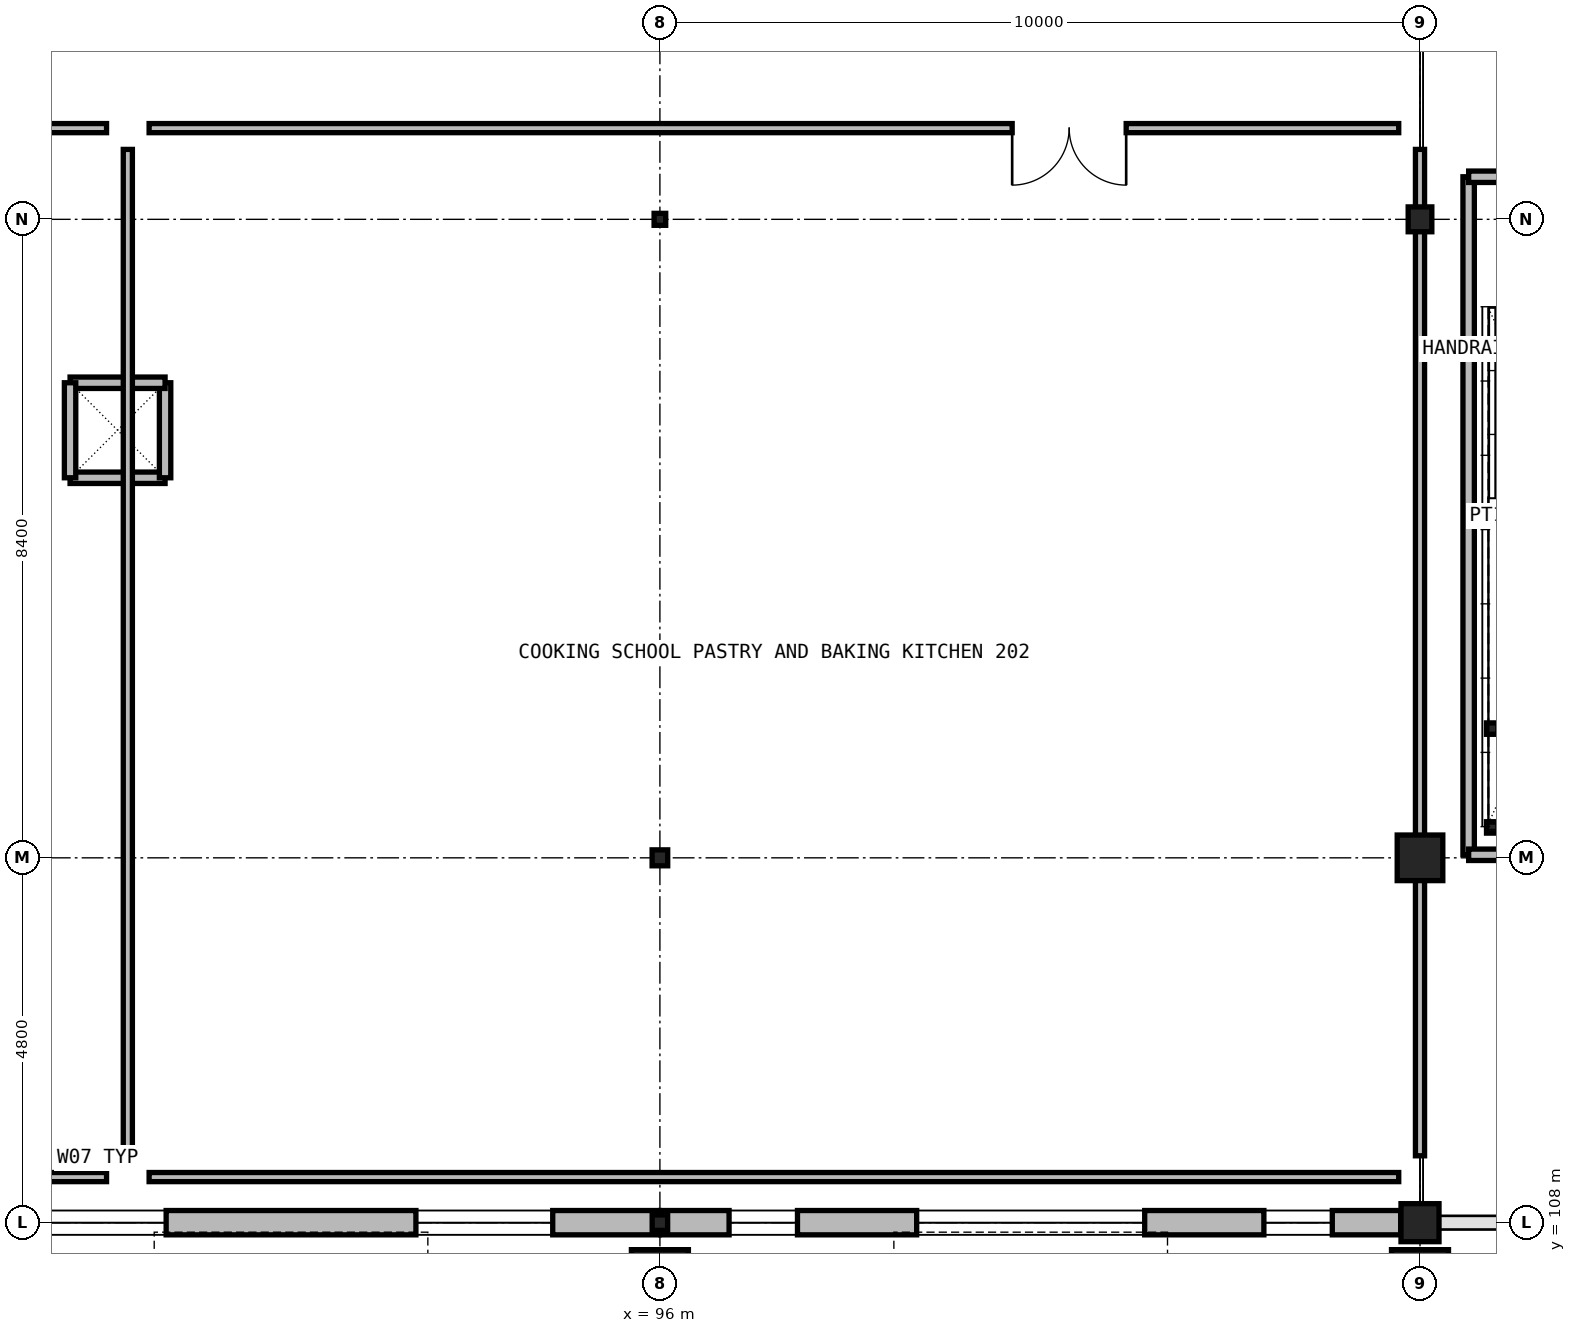
"""IFC4 building model, lengths in metres.
Left out: names, types, materials, properties, quantities, classifications, styles, units other than length and angle.
Written with IfcOpenShell. Run it as: python <this file> out.ifc"""

import sys

from ifc_helpers import new_model, si_unit, direction, frame, frame_2d, origin, origin_2d_with_axis, place, context, subcontext, project, spatial, rectangle, hollow_rectangle, i_section, extrude, element, fill, save


model = new_model("IFC4")
c1 = context("Model", 3, precision=1e-05, world=origin(), true_north=direction((0.0, 1.0)))
c2 = subcontext(c1, "Body", "Model", "MODEL_VIEW")
j1 = project(units=[si_unit("LENGTHUNIT", "METRE"), si_unit("PLANEANGLEUNIT", "RADIAN")], contexts=[c1])
p1 = place(None, origin())
s1 = spatial("IfcSite", under=j1, at=p1, CompositionType="ELEMENT")
p2 = place(p1, origin())
s2 = spatial("IfcBuilding", under=s1, at=p2, CompositionType="ELEMENT")
p3 = place(p2, frame((0.0, 0.0, 8.4)))
s3 = spatial("IfcBuildingStorey", under=s2, at=p3, CompositionType="ELEMENT", Elevation=8.4)
for number, where, z_axis, x_axis in (
    (1, (96.0, 107.42, 0.0), (0.0, 0.0, 1.0), (1.0, 0.0, 0.0)),
    (2, (106.0, 107.42, 0.0), (0.0, 0.0, 1.0), (1.0, 0.0, 0.0)),
):
    element("IfcColumn", number, at=place(p3, frame(where, z_axis=z_axis, x_axis=x_axis)), inside=s3, PredefinedType="PILASTER", context=c2, shape_type="SweptSolid", body=[
        extrude(rectangle(XDim=0.75, YDim=0.45, at=origin_2d_with_axis()), origin(), (0.0, 0.0, 1.0), 3.6),
    ])
p4 = place(p3, frame((96.0, 108.0, 0.0), z_axis=(0.0, 0.0, 1.0), x_axis=(1.0, 0.0, 0.0)))
e3 = element("IfcColumn", 3, at=p4, inside=s3, PredefinedType="COLUMN", context=c2, shape_type="SweptSolid", body=[
    extrude(i_section(OverallWidth=0.203, OverallDepth=0.203, WebThickness=0.007, FlangeThickness=0.011, FilletRadius=0.011, at=origin_2d_with_axis()), origin(), (0.0, 0.0, 1.0), 3.6),
])
p5 = place(p3, frame((96.0, 112.8, 0.0), z_axis=(0.0, 0.0, 1.0), x_axis=(1.0, 0.0, 0.0)))
e4 = element("IfcColumn", 4, at=p5, inside=s3, PredefinedType="COLUMN", context=c2, shape_type="SweptSolid", body=[
    extrude(i_section(OverallWidth=0.205, OverallDepth=0.21, WebThickness=0.009, FlangeThickness=0.014, FilletRadius=0.011, at=origin_2d_with_axis()), origin(), (0.0, 0.0, 1.0), 3.6),
])
p6 = place(p3, frame((96.0, 121.2, 0.0), z_axis=(0.0, 0.0, 1.0), x_axis=(1.0, 0.0, 0.0)))
e5 = element("IfcColumn", 5, at=p6, inside=s3, PredefinedType="COLUMN", context=c2, shape_type="SweptSolid", body=[
    extrude(i_section(OverallWidth=0.153, OverallDepth=0.158, WebThickness=0.007, FlangeThickness=0.01, FilletRadius=0.009, at=origin_2d_with_axis()), origin(), (0.0, 0.0, 1.0), 3.6),
])
p7 = place(p3, frame((106.0, 108.0, 0.0), z_axis=(0.0, 0.0, 1.0), x_axis=(1.0, 0.0, 0.0)))
e6 = element("IfcColumn", 6, at=p7, inside=s3, PredefinedType="COLUMN", context=c2, shape_type="SweptSolid", body=[
    extrude(rectangle(XDim=0.5, YDim=0.5, at=origin_2d_with_axis()), origin(), (0.0, 0.0, 1.0), 3.6),
])
p8 = place(p3, frame((106.0, 112.8, 0.0), z_axis=(0.0, 0.0, 1.0), x_axis=(1.0, 0.0, 0.0)))
e7 = element("IfcColumn", 7, at=p8, inside=s3, PredefinedType="COLUMN", context=c2, shape_type="SweptSolid", body=[
    extrude(rectangle(XDim=0.6, YDim=0.6, at=origin_2d_with_axis()), origin(), (0.0, 0.0, 1.0), 3.6),
])
p9 = place(p3, frame((106.0, 121.2, 0.0), z_axis=(0.0, 0.0, 1.0), x_axis=(1.0, 0.0, 0.0)))
e8 = element("IfcColumn", 8, at=p9, inside=s3, PredefinedType="COLUMN", context=c2, shape_type="SweptSolid", body=[
    extrude(i_section(OverallWidth=0.311, OverallDepth=0.327, WebThickness=0.016, FlangeThickness=0.025, FilletRadius=0.017, at=origin_2d_with_axis()), origin(), (0.0, 0.0, 1.0), 3.6),
])
for number, where, z_axis, x_axis in (
    (9, (106.95, 113.2, 0.0), (0.0, 0.0, 1.0), (1.0, 0.0, 0.0)),
    (10, (106.95, 114.5, 0.0), (0.0, 0.0, 1.0), (1.0, 0.0, 0.0)),
):
    element("IfcColumn", number, at=place(p3, frame(where, z_axis=z_axis, x_axis=x_axis)), inside=s3, PredefinedType="COLUMN", context=c2, shape_type="SweptSolid", body=[
        extrude(hollow_rectangle(XDim=0.15, YDim=0.15, WallThickness=0.006, InnerFilletRadius=0.006, OuterFilletRadius=0.012, at=origin_2d_with_axis()), origin(), (0.0, 0.0, 1.0), 3.6),
    ])
p10 = place(p3, frame((86.304, 108.0, 0.0), z_axis=(0.0, 0.0, 1.0), x_axis=(1.0, 0.0, 0.0)))
e11 = element("IfcWall", 11, at=p10, inside=s3, PredefinedType="SOLIDWALL", context=c2, shape_type="SweptSolid", body=[
    extrude(rectangle(XDim=9.686, YDim=0.32, at=frame_2d((4.843, 0.0), x_axis=(1.0, 0.0))), origin(), (0.0, 0.0, 1.0), 2.92),
])
p11 = place(p10, frame((1.4, 0.0, 0.85)))
e12 = element("IfcOpeningElement", 12, at=p11, cuts=e11, PredefinedType="OPENING", context=c2, shape_type="SweptSolid", body=[
    extrude(rectangle(XDim=1.8, YDim=1.9, at=frame_2d((0.9, 0.95), x_axis=(1.0, 0.0))), frame((0.0, 0.17, 0.0), z_axis=(0.0, -1.0, 0.0), x_axis=(1.0, 0.0, 0.0)), (0.0, 0.0, 1.0), 0.34),
])
p12 = place(p10, frame((6.486, 0.0, 0.85)))
e13 = element("IfcOpeningElement", 13, at=p12, cuts=e11, PredefinedType="OPENING", context=c2, shape_type="SweptSolid", body=[
    extrude(rectangle(XDim=1.8, YDim=1.9, at=frame_2d((0.9, 0.95), x_axis=(1.0, 0.0))), frame((0.0, 0.17, 0.0), z_axis=(0.0, -1.0, 0.0), x_axis=(1.0, 0.0, 0.0)), (0.0, 0.0, 1.0), 0.34),
])
p13 = place(p3, frame((96.01, 108.0, 0.0), z_axis=(0.0, 0.0, 1.0), x_axis=(1.0, 0.0, 0.0)))
e14 = element("IfcWall", 14, at=p13, inside=s3, PredefinedType="SOLIDWALL", context=c2, shape_type="SweptSolid", body=[
    extrude(rectangle(XDim=9.736, YDim=0.32, at=frame_2d((4.868, 0.0), x_axis=(1.0, 0.0))), origin(), (0.0, 0.0, 1.0), 2.92),
])
p14 = place(p13, frame((3.368, 0.0, 0.85)))
e15 = element("IfcOpeningElement", 15, at=p14, cuts=e14, PredefinedType="OPENING", context=c2, shape_type="SweptSolid", body=[
    extrude(rectangle(XDim=3.0, YDim=1.9, at=frame_2d((1.5, 0.95), x_axis=(1.0, 0.0))), frame((0.0, 0.17, 0.0), z_axis=(0.0, -1.0, 0.0), x_axis=(1.0, 0.0, 0.0)), (0.0, 0.0, 1.0), 0.34),
])
p15 = place(p13, frame((0.9, 0.0, 0.85)))
e16 = element("IfcOpeningElement", 16, at=p15, cuts=e14, PredefinedType="OPENING", context=c2, shape_type="SweptSolid", body=[
    extrude(rectangle(XDim=0.9, YDim=1.9, at=frame_2d((0.45, 0.95), x_axis=(1.0, 0.0))), frame((0.0, 0.17, 0.0), z_axis=(0.0, -1.0, 0.0), x_axis=(1.0, 0.0, 0.0)), (0.0, 0.0, 1.0), 0.34),
])
p16 = place(p13, frame((7.936, 0.0, 0.85)))
e17 = element("IfcOpeningElement", 17, at=p16, cuts=e14, PredefinedType="OPENING", context=c2, shape_type="SweptSolid", body=[
    extrude(rectangle(XDim=0.9, YDim=1.9, at=frame_2d((0.45, 0.95), x_axis=(1.0, 0.0))), frame((0.0, 0.17, 0.0), z_axis=(0.0, -1.0, 0.0), x_axis=(1.0, 0.0, 0.0)), (0.0, 0.0, 1.0), 0.34),
])
p17 = place(p3, frame((106.64, 121.76, 0.0), z_axis=(0.0, 0.0, 1.0), x_axis=(0.0, -1.0, 0.0)))
e18 = element("IfcWall", 18, at=p17, inside=s3, PredefinedType="PARTITIONING", context=c2, shape_type="SweptSolid", body=[
    extrude(rectangle(XDim=8.92, YDim=0.15, at=frame_2d((4.46, 0.0), x_axis=(1.0, 0.0))), origin(), (0.0, 0.0, 1.0), 2.78),
])
p18 = place(p3, frame((106.64, 112.84, 0.0), z_axis=(0.0, 0.0, 1.0), x_axis=(1.0, 0.0, 0.0)))
e19 = element("IfcWall", 19, at=p18, inside=s3, PredefinedType="PARTITIONING", context=c2, shape_type="SweptSolid", body=[
    extrude(rectangle(XDim=3.62, YDim=0.15, at=frame_2d((1.81, 0.0), x_axis=(1.0, 0.0))), origin(), (0.0, 0.0, 1.0), 2.78),
])
p19 = place(p3, frame((110.26, 121.76, 0.0), z_axis=(0.0, 0.0, 1.0), x_axis=(-1.0, 0.0, 0.0)))
e20 = element("IfcWall", 20, at=p19, inside=s3, PredefinedType="PARTITIONING", context=c2, shape_type="SweptSolid", body=[
    extrude(rectangle(XDim=3.62, YDim=0.15, at=frame_2d((1.81, 0.0), x_axis=(1.0, 0.0))), origin(), (0.0, 0.0, 1.0), 2.78),
])
p20 = place(p19, frame((1.31, 0.0, 0.0)))
e21 = element("IfcOpeningElement", 21, at=p20, cuts=e20, PredefinedType="OPENING", context=c2, shape_type="SweptSolid", body=[
    extrude(rectangle(XDim=1.0, YDim=2.15, at=frame_2d((0.5, 1.075), x_axis=(1.0, 0.0))), frame((0.0, 0.085, 0.0), z_axis=(0.0, -1.0, 0.0), x_axis=(1.0, 0.0, 0.0)), (0.0, 0.0, 1.0), 0.17),
])
for number, where, z_axis, x_axis in (
    (22, (88.24, 117.8, 0.0), (0.0, 0.0, 1.0), (1.0, 0.0, 0.0)),
    (23, (89.49, 117.8, 0.0), (0.0, 0.0, 1.0), (0.0, 1.0, 0.0)),
    (24, (89.49, 119.05, 0.0), (0.0, 0.0, 1.0), (-1.0, 0.0, 0.0)),
    (25, (88.24, 119.05, 0.0), (0.0, 0.0, 1.0), (0.0, -1.0, 0.0)),
):
    element("IfcWall", number, at=place(p3, frame(where, z_axis=z_axis, x_axis=x_axis)), inside=s3, PredefinedType="PARTITIONING", context=c2, shape_type="SweptSolid", body=[
        extrude(rectangle(XDim=1.25, YDim=0.15, at=frame_2d((0.625, 0.0), x_axis=(1.0, 0.0))), origin(), (0.0, 0.0, 1.0), 2.88),
    ])
p21 = place(p3, frame((67.08, 108.6, 0.0), z_axis=(0.0, 0.0, 1.0), x_axis=(1.0, 0.0, 0.0)))
e26 = element("IfcWall", 26, at=p21, inside=s3, PredefinedType="PARTITIONING", context=c2, shape_type="SweptSolid", body=[
    extrude(rectangle(XDim=21.64, YDim=0.12, at=frame_2d((10.82, 0.0), x_axis=(1.0, 0.0))), origin(), (0.0, 0.0, 1.0), 2.74),
])
p22 = place(p3, frame((89.0, 108.88, 0.0), z_axis=(0.0, 0.0, 1.0), x_axis=(0.0, 1.0, 0.0)))
e27 = element("IfcWall", 27, at=p22, inside=s3, PredefinedType="PARTITIONING", context=c2, shape_type="SweptSolid", body=[
    extrude(rectangle(XDim=13.24, YDim=0.12, at=frame_2d((6.62, 0.0), x_axis=(1.0, 0.0))), origin(), (0.0, 0.0, 1.0), 2.74),
])
p23 = place(p3, frame((88.72, 122.4, 0.0), z_axis=(0.0, 0.0, 1.0), x_axis=(-1.0, 0.0, 0.0)))
e28 = element("IfcWall", 28, at=p23, inside=s3, PredefinedType="PARTITIONING", context=c2, shape_type="SweptSolid", body=[
    extrude(rectangle(XDim=21.64, YDim=0.12, at=frame_2d((10.82, 0.0), x_axis=(1.0, 0.0))), origin(), (0.0, 0.0, 1.0), 2.74),
])
p24 = place(p23, frame((6.445, 0.0, 0.0)))
e29 = element("IfcOpeningElement", 29, at=p24, cuts=e28, PredefinedType="OPENING", context=c2, shape_type="SweptSolid", body=[
    extrude(rectangle(XDim=1.5, YDim=2.25, at=frame_2d((0.75, 1.125), x_axis=(1.0, 0.0))), frame((0.0, 0.07, 0.0), z_axis=(0.0, -1.0, 0.0), x_axis=(1.0, 0.0, 0.0)), (0.0, 0.0, 1.0), 0.14),
])
p25 = place(p3, frame((89.28, 108.6, 0.0), z_axis=(0.0, 0.0, 1.0), x_axis=(1.0, 0.0, 0.0)))
e30 = element("IfcWall", 30, at=p25, inside=s3, PredefinedType="PARTITIONING", context=c2, shape_type="SweptSolid", body=[
    extrude(rectangle(XDim=16.44, YDim=0.12, at=frame_2d((8.22, 0.0), x_axis=(1.0, 0.0))), origin(), (0.0, 0.0, 1.0), 2.74),
])
p26 = place(p3, frame((106.0, 108.88, 0.0), z_axis=(0.0, 0.0, 1.0), x_axis=(0.0, 1.0, 0.0)))
e31 = element("IfcWall", 31, at=p26, inside=s3, PredefinedType="PARTITIONING", context=c2, shape_type="SweptSolid", body=[
    extrude(rectangle(XDim=13.24, YDim=0.12, at=frame_2d((6.62, 0.0), x_axis=(1.0, 0.0))), origin(), (0.0, 0.0, 1.0), 2.74),
])
p27 = place(p3, frame((105.72, 122.4, 0.0), z_axis=(0.0, 0.0, 1.0), x_axis=(-1.0, 0.0, 0.0)))
e32 = element("IfcWall", 32, at=p27, inside=s3, PredefinedType="PARTITIONING", context=c2, shape_type="SweptSolid", body=[
    extrude(rectangle(XDim=16.44, YDim=0.12, at=frame_2d((8.22, 0.0), x_axis=(1.0, 0.0))), origin(), (0.0, 0.0, 1.0), 2.74),
])
p28 = place(p27, frame((3.586, 0.0, 0.0)))
e33 = element("IfcOpeningElement", 33, at=p28, cuts=e32, PredefinedType="OPENING", context=c2, shape_type="SweptSolid", body=[
    extrude(rectangle(XDim=1.5, YDim=2.25, at=frame_2d((0.75, 1.125), x_axis=(1.0, 0.0))), frame((0.0, 0.07, 0.0), z_axis=(0.0, -1.0, 0.0), x_axis=(1.0, 0.0, 0.0)), (0.0, 0.0, 1.0), 0.14),
])
p29 = place(p11, origin())
e34 = element("IfcWindow", 34, at=p29, inside=s3, PartitioningType="SINGLE_PANEL", PredefinedType="WINDOW", context=c2, shape_type="SweptSolid", body=[
    extrude(rectangle(XDim=1.8, YDim=1.9, at=frame_2d((0.9, 0.95), x_axis=(1.0, 0.0))), frame((0.0, 0.03, 0.0), z_axis=(0.0, -1.0, 0.0), x_axis=(1.0, 0.0, 0.0)), (0.0, 0.0, 1.0), 0.06),
])
fill(e12, e34)
p30 = place(p12, origin())
e35 = element("IfcWindow", 35, at=p30, inside=s3, PartitioningType="SINGLE_PANEL", PredefinedType="WINDOW", context=c2, shape_type="SweptSolid", body=[
    extrude(rectangle(XDim=1.8, YDim=1.9, at=frame_2d((0.9, 0.95), x_axis=(1.0, 0.0))), frame((0.0, 0.03, 0.0), z_axis=(0.0, -1.0, 0.0), x_axis=(1.0, 0.0, 0.0)), (0.0, 0.0, 1.0), 0.06),
])
fill(e13, e35)
p31 = place(p14, origin())
e36 = element("IfcWindow", 36, at=p31, inside=s3, PartitioningType="SINGLE_PANEL", PredefinedType="WINDOW", context=c2, shape_type="SweptSolid", body=[
    extrude(rectangle(XDim=3.0, YDim=1.9, at=frame_2d((1.5, 0.95), x_axis=(1.0, 0.0))), frame((0.0, 0.03, 0.0), z_axis=(0.0, -1.0, 0.0), x_axis=(1.0, 0.0, 0.0)), (0.0, 0.0, 1.0), 0.06),
])
fill(e15, e36)
p32 = place(p15, origin())
e37 = element("IfcWindow", 37, at=p32, inside=s3, PartitioningType="SINGLE_PANEL", PredefinedType="WINDOW", context=c2, shape_type="SweptSolid", body=[
    extrude(rectangle(XDim=0.9, YDim=1.9, at=frame_2d((0.45, 0.95), x_axis=(1.0, 0.0))), frame((0.0, 0.03, 0.0), z_axis=(0.0, -1.0, 0.0), x_axis=(1.0, 0.0, 0.0)), (0.0, 0.0, 1.0), 0.06),
])
fill(e16, e37)
p33 = place(p16, origin())
e38 = element("IfcWindow", 38, at=p33, inside=s3, PartitioningType="SINGLE_PANEL", PredefinedType="WINDOW", context=c2, shape_type="SweptSolid", body=[
    extrude(rectangle(XDim=0.9, YDim=1.9, at=frame_2d((0.45, 0.95), x_axis=(1.0, 0.0))), frame((0.0, 0.03, 0.0), z_axis=(0.0, -1.0, 0.0), x_axis=(1.0, 0.0, 0.0)), (0.0, 0.0, 1.0), 0.06),
])
fill(e17, e38)
p34 = place(p28, origin())
e39 = element("IfcDoor", 39, at=p34, inside=s3, OperationType="DOUBLE_SWING_LEFT", PredefinedType="DOOR", context=c2, shape_type="SweptSolid", body=[
    extrude(rectangle(XDim=1.5, YDim=2.25, at=frame_2d((0.75, 1.125), x_axis=(1.0, 0.0))), frame((0.0, 0.025, 0.0), z_axis=(0.0, -1.0, 0.0), x_axis=(1.0, 0.0, 0.0)), (0.0, 0.0, 1.0), 0.05),
])
fill(e33, e39)
save(model, sys.argv[1])
